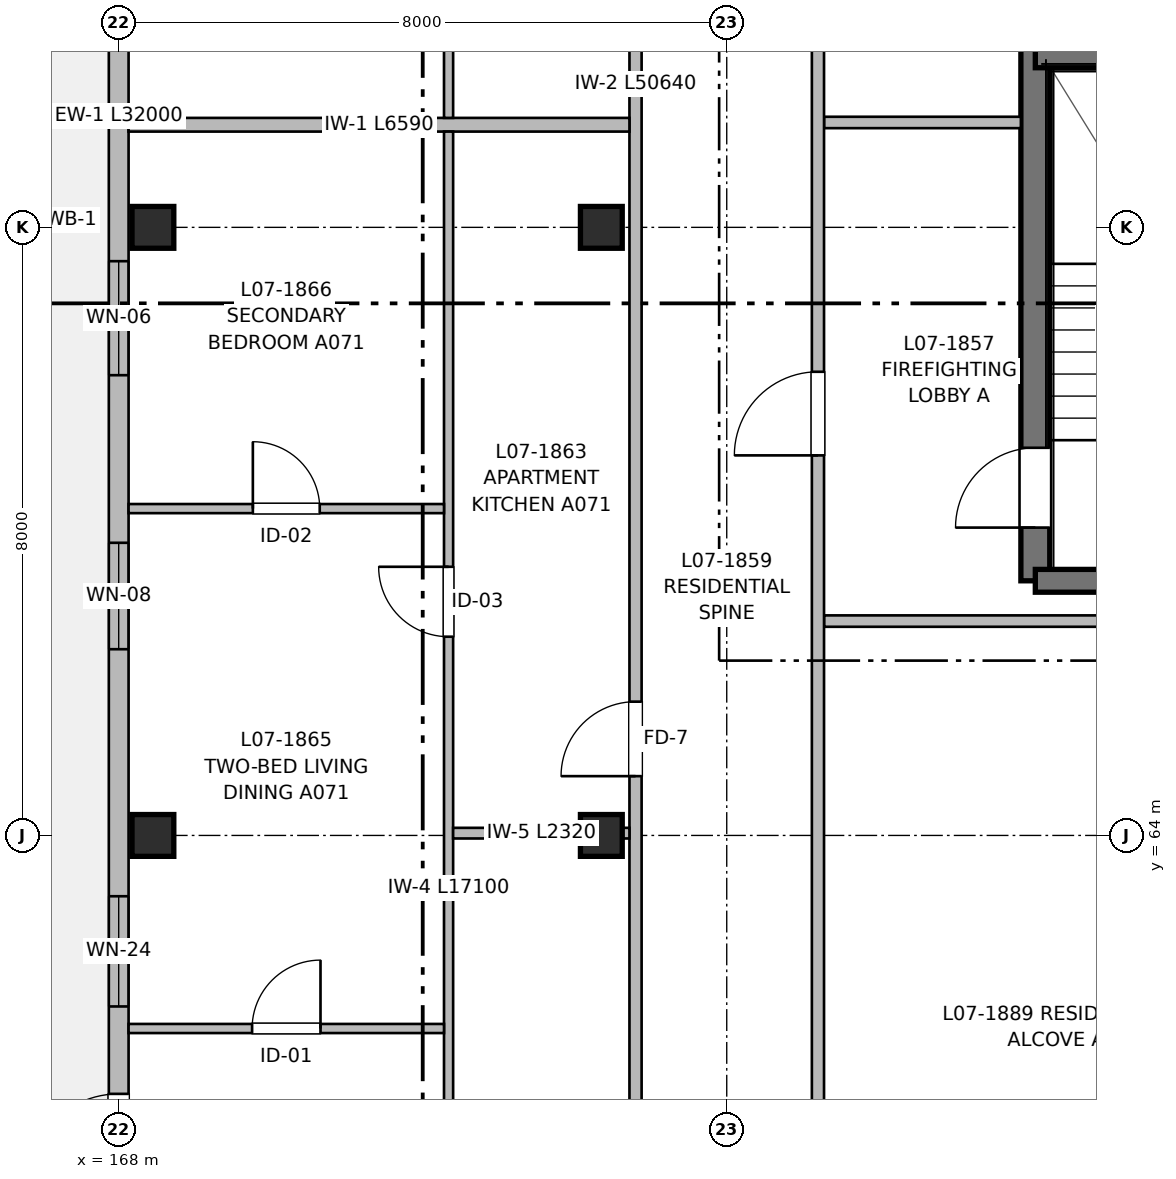
"""IFC4 building model, lengths in metres.
Left out: names, types, materials, properties, quantities, classifications, styles, units other than length and angle.
Written with IfcOpenShell. Run it as: python <this file> out.ifc"""

import sys

from ifc_helpers import new_model, si_unit, direction, frame, frame_2d, origin, origin_2d, place, context, subcontext, project, spatial, rectangle, extrude, element, fill, save


model = new_model("IFC4")
c1 = context("Model", 3, precision=1e-05, world=origin(), true_north=direction((0.0, 1.0)))
c2 = subcontext(c1, "Body", "Model", "MODEL_VIEW")
j1 = project(units=[si_unit("LENGTHUNIT", "METRE"), si_unit("PLANEANGLEUNIT", "RADIAN")], contexts=[c1])
p1 = place(None, origin())
s1 = spatial("IfcSite", under=j1, at=p1, CompositionType="ELEMENT")
p2 = place(p1, origin())
s2 = spatial("IfcBuilding", under=s1, at=p2, CompositionType="ELEMENT")
p3 = place(p2, frame((0.0, 0.0, 23.36)))
s3 = spatial("IfcBuildingStorey", under=s2, at=p3, CompositionType="ELEMENT", Elevation=23.36)
for number, where, z_axis, x_axis in (
    (1, (168.45, 64.0, 0.0), (0.0, 0.0, 1.0), (1.0, 0.0, 0.0)),
    (2, (168.45, 72.0, 0.0), (0.0, 0.0, 1.0), (1.0, 0.0, 0.0)),
    (3, (174.35, 64.0, 0.0), (0.0, 0.0, 1.0), (1.0, 0.0, 0.0)),
    (4, (174.35, 72.0, 0.0), (0.0, 0.0, 1.0), (1.0, 0.0, 0.0)),
):
    element("IfcColumn", number, at=place(p3, frame(where, z_axis=z_axis, x_axis=x_axis)), inside=s3, PredefinedType="COLUMN", context=c2, shape_type="SweptSolid", body=[
        extrude(rectangle(XDim=0.55, YDim=0.55, at=origin_2d()), origin(), (0.0, 0.0, 1.0), 3.2),
    ])
p4 = place(p3, frame((180.06, 67.35, 0.0), z_axis=(0.0, 0.0, 1.0), x_axis=(0.0, 1.0, 0.0)))
e5 = element("IfcWall", 5, at=p4, inside=s3, PredefinedType="SHEAR", context=c2, shape_type="SweptSolid", body=[
    extrude(rectangle(XDim=13.15, YDim=0.38, at=frame_2d((6.575, 0.0))), origin(), (0.0, 0.0, 1.0), 3.2),
])
p5 = place(p4, frame((0.7, 0.0, 0.0)))
e6 = element("IfcOpeningElement", 6, at=p5, cuts=e5, PredefinedType="OPENING", context=c2, shape_type="SweptSolid", body=[
    extrude(rectangle(XDim=1.05, YDim=2.15, at=frame_2d((0.525, 1.075))), frame((0.0, 0.2, 0.0), z_axis=(0.0, -1.0, 0.0), x_axis=(1.0, 0.0, 0.0)), (0.0, 0.0, 1.0), 0.4),
])
p6 = place(p3, frame((183.47, 67.35, 0.0), z_axis=(0.0, 0.0, 1.0), x_axis=(-1.0, 0.0, 0.0)))
e7 = element("IfcWall", 7, at=p6, inside=s3, PredefinedType="SHEAR", context=c2, shape_type="SweptSolid", body=[
    extrude(rectangle(XDim=3.41, YDim=0.3, at=frame_2d((1.705, 0.0))), origin(), (0.0, 0.0, 1.0), 3.2),
])
p7 = place(p3, frame((180.06, 74.24, 0.0), z_axis=(0.0, 0.0, 1.0), x_axis=(1.0, 0.0, 0.0)))
e8 = element("IfcWall", 8, at=p7, inside=s3, PredefinedType="SHEAR", context=c2, shape_type="SweptSolid", body=[
    extrude(rectangle(XDim=3.41, YDim=0.28, at=frame_2d((1.705, 0.0))), origin(), (0.0, 0.0, 1.0), 3.2),
])
p8 = place(p3, frame((168.0, 56.0, 0.0), z_axis=(0.0, 0.0, 1.0), x_axis=(0.0, 1.0, 0.0)))
e9 = element("IfcWall", 9, at=p8, inside=s3, PredefinedType="SOLIDWALL", context=c2, shape_type="SweptSolid", body=[
    extrude(rectangle(XDim=32.0, YDim=0.26, at=frame_2d((16.0, 0.0))), origin(), (0.0, 0.0, 1.0), 2.98),
])
p9 = place(p8, frame((3.4, 0.0, 0.0)))
e10 = element("IfcOpeningElement", 10, at=p9, cuts=e9, PredefinedType="OPENING", context=c2, shape_type="SweptSolid", body=[
    extrude(rectangle(XDim=1.2, YDim=2.2, at=frame_2d((0.6, 1.1))), frame((0.0, 0.14, 0.0), z_axis=(0.0, -1.0, 0.0), x_axis=(1.0, 0.0, 0.0)), (0.0, 0.0, 1.0), 0.28),
])
p10 = place(p8, frame((5.75, 0.0, 0.77)))
e11 = element("IfcOpeningElement", 11, at=p10, cuts=e9, PredefinedType="OPENING", context=c2, shape_type="SweptSolid", body=[
    extrude(rectangle(XDim=1.45, YDim=1.45, at=frame_2d((0.725, 0.725))), frame((0.0, 0.14, 0.0), z_axis=(0.0, -1.0, 0.0), x_axis=(1.0, 0.0, 0.0)), (0.0, 0.0, 1.0), 0.28),
])
p11 = place(p8, frame((10.45, 0.0, 0.87)))
e12 = element("IfcOpeningElement", 12, at=p11, cuts=e9, PredefinedType="OPENING", context=c2, shape_type="SweptSolid", body=[
    extrude(rectangle(XDim=1.4, YDim=1.35, at=frame_2d((0.7, 0.675))), frame((0.0, 0.14, 0.0), z_axis=(0.0, -1.0, 0.0), x_axis=(1.0, 0.0, 0.0)), (0.0, 0.0, 1.0), 0.28),
])
p12 = place(p8, frame((19.375, 0.0, 0.87)))
e13 = element("IfcOpeningElement", 13, at=p12, cuts=e9, PredefinedType="OPENING", context=c2, shape_type="SweptSolid", body=[
    extrude(rectangle(XDim=1.25, YDim=1.35, at=frame_2d((0.625, 0.675))), frame((0.0, 0.14, 0.0), z_axis=(0.0, -1.0, 0.0), x_axis=(1.0, 0.0, 0.0)), (0.0, 0.0, 1.0), 0.28),
])
p13 = place(p8, frame((27.35, 0.0, 0.82)))
e14 = element("IfcOpeningElement", 14, at=p13, cuts=e9, PredefinedType="OPENING", context=c2, shape_type="SweptSolid", body=[
    extrude(rectangle(XDim=1.3, YDim=1.4, at=frame_2d((0.65, 0.7))), frame((0.0, 0.14, 0.0), z_axis=(0.0, -1.0, 0.0), x_axis=(1.0, 0.0, 0.0)), (0.0, 0.0, 1.0), 0.28),
])
p14 = place(p8, frame((14.055, 0.0, 0.82)))
e15 = element("IfcOpeningElement", 15, at=p14, cuts=e9, PredefinedType="OPENING", context=c2, shape_type="SweptSolid", body=[
    extrude(rectangle(XDim=1.5, YDim=1.4, at=frame_2d((0.75, 0.7))), frame((0.0, 0.14, 0.0), z_axis=(0.0, -1.0, 0.0), x_axis=(1.0, 0.0, 0.0)), (0.0, 0.0, 1.0), 0.28),
])
p15 = place(p8, frame((29.945, 0.0, 0.82)))
e16 = element("IfcOpeningElement", 16, at=p15, cuts=e9, PredefinedType="OPENING", context=c2, shape_type="SweptSolid", body=[
    extrude(rectangle(XDim=1.5, YDim=1.4, at=frame_2d((0.75, 0.7))), frame((0.0, 0.14, 0.0), z_axis=(0.0, -1.0, 0.0), x_axis=(1.0, 0.0, 0.0)), (0.0, 0.0, 1.0), 0.28),
])
p16 = place(p3, frame((177.28, 66.82, 0.0), z_axis=(0.0, 0.0, 1.0), x_axis=(1.0, 0.0, 0.0)))
e17 = element("IfcWall", 17, at=p16, inside=s3, PredefinedType="PARTITIONING", context=c2, shape_type="SweptSolid", body=[
    extrude(rectangle(XDim=6.59, YDim=0.15, at=frame_2d((3.295, 0.0))), origin(), (0.0, 0.0, 1.0), 2.935),
])
p17 = place(p3, frame((177.28, 73.38, 0.0), z_axis=(0.0, 0.0, 1.0), x_axis=(1.0, 0.0, 0.0)))
e18 = element("IfcWall", 18, at=p17, inside=s3, PredefinedType="PARTITIONING", context=c2, shape_type="SweptSolid", body=[
    extrude(rectangle(XDim=2.59, YDim=0.15, at=frame_2d((1.295, 0.0))), origin(), (0.0, 0.0, 1.0), 2.935),
])
p18 = place(p3, frame((174.8, 56.16, 0.0), z_axis=(0.0, 0.0, 1.0), x_axis=(0.0, 1.0, 0.0)))
e19 = element("IfcWall", 19, at=p18, inside=s3, PredefinedType="PARTITIONING", context=c2, shape_type="SweptSolid", body=[
    extrude(rectangle(XDim=50.64, YDim=0.16, at=frame_2d((25.32, 0.0))), origin(), (0.0, 0.0, 1.0), 2.935),
])
p19 = place(p18, frame((8.62, 0.0, 0.0)))
e20 = element("IfcOpeningElement", 20, at=p19, cuts=e19, PredefinedType="OPENING", context=c2, shape_type="SweptSolid", body=[
    extrude(rectangle(XDim=0.98, YDim=2.15, at=frame_2d((0.49, 1.075))), frame((0.0, 0.09, 0.0), z_axis=(0.0, -1.0, 0.0), x_axis=(1.0, 0.0, 0.0)), (0.0, 0.0, 1.0), 0.18),
])
p20 = place(p18, frame((25.85, 0.0, 0.0)))
e21 = element("IfcOpeningElement", 21, at=p20, cuts=e19, PredefinedType="OPENING", context=c2, shape_type="SweptSolid", body=[
    extrude(rectangle(XDim=1.02, YDim=2.15, at=frame_2d((0.51, 1.075))), frame((0.0, 0.09, 0.0), z_axis=(0.0, -1.0, 0.0), x_axis=(1.0, 0.0, 0.0)), (0.0, 0.0, 1.0), 0.18),
])
p21 = place(p18, frame((42.62, 0.0, 0.0)))
e22 = element("IfcOpeningElement", 22, at=p21, cuts=e19, PredefinedType="OPENING", context=c2, shape_type="SweptSolid", body=[
    extrude(rectangle(XDim=0.98, YDim=2.15, at=frame_2d((0.49, 1.075))), frame((0.0, 0.09, 0.0), z_axis=(0.0, -1.0, 0.0), x_axis=(1.0, 0.0, 0.0)), (0.0, 0.0, 1.0), 0.18),
])
p22 = place(p3, frame((177.2, 56.16, 0.0), z_axis=(0.0, 0.0, 1.0), x_axis=(0.0, 1.0, 0.0)))
e23 = element("IfcWall", 23, at=p22, inside=s3, PredefinedType="PARTITIONING", context=c2, shape_type="SweptSolid", body=[
    extrude(rectangle(XDim=50.64, YDim=0.16, at=frame_2d((25.32, 0.0))), origin(), (0.0, 0.0, 1.0), 2.935),
])
p23 = place(p22, frame((12.84, 0.0, 0.0)))
e24 = element("IfcOpeningElement", 24, at=p23, cuts=e23, PredefinedType="OPENING", context=c2, shape_type="SweptSolid", body=[
    extrude(rectangle(XDim=1.1, YDim=2.15, at=frame_2d((0.55, 1.075))), frame((0.0, 0.09, 0.0), z_axis=(0.0, -1.0, 0.0), x_axis=(1.0, 0.0, 0.0)), (0.0, 0.0, 1.0), 0.18),
])
p24 = place(p22, frame((19.24, 0.0, 0.0)))
e25 = element("IfcOpeningElement", 25, at=p24, cuts=e23, PredefinedType="OPENING", context=c2, shape_type="SweptSolid", body=[
    extrude(rectangle(XDim=1.6, YDim=2.15, at=frame_2d((0.8, 1.075))), frame((0.0, 0.09, 0.0), z_axis=(0.0, -1.0, 0.0), x_axis=(1.0, 0.0, 0.0)), (0.0, 0.0, 1.0), 0.18),
])
p25 = place(p22, frame((1.8, 0.0, 0.0)))
e26 = element("IfcOpeningElement", 26, at=p25, cuts=e23, PredefinedType="OPENING", context=c2, shape_type="SweptSolid", body=[
    extrude(rectangle(XDim=0.96, YDim=2.15, at=frame_2d((0.48, 1.075))), frame((0.0, 0.09, 0.0), z_axis=(0.0, -1.0, 0.0), x_axis=(1.0, 0.0, 0.0)), (0.0, 0.0, 1.0), 0.18),
])
p26 = place(p22, frame((32.87, 0.0, 0.0)))
e27 = element("IfcOpeningElement", 27, at=p26, cuts=e23, PredefinedType="OPENING", context=c2, shape_type="SweptSolid", body=[
    extrude(rectangle(XDim=0.98, YDim=2.15, at=frame_2d((0.49, 1.075))), frame((0.0, 0.09, 0.0), z_axis=(0.0, -1.0, 0.0), x_axis=(1.0, 0.0, 0.0)), (0.0, 0.0, 1.0), 0.18),
])
p27 = place(p22, frame((41.13, 0.0, 0.0)))
e28 = element("IfcOpeningElement", 28, at=p27, cuts=e23, PredefinedType="OPENING", context=c2, shape_type="SweptSolid", body=[
    extrude(rectangle(XDim=0.98, YDim=2.15, at=frame_2d((0.49, 1.075))), frame((0.0, 0.09, 0.0), z_axis=(0.0, -1.0, 0.0), x_axis=(1.0, 0.0, 0.0)), (0.0, 0.0, 1.0), 0.18),
])
p28 = place(p3, frame((168.13, 73.35, 0.0), z_axis=(0.0, 0.0, 1.0), x_axis=(1.0, 0.0, 0.0)))
e29 = element("IfcWall", 29, at=p28, inside=s3, PredefinedType="PARTITIONING", context=c2, shape_type="SweptSolid", body=[
    extrude(rectangle(XDim=6.59, YDim=0.18, at=frame_2d((3.295, 0.0))), origin(), (0.0, 0.0, 1.0), 2.935),
])
p29 = place(p3, frame((172.34, 56.16, 0.0), z_axis=(0.0, 0.0, 1.0), x_axis=(0.0, 1.0, 0.0)))
e30 = element("IfcWall", 30, at=p29, inside=s3, PredefinedType="PARTITIONING", context=c2, shape_type="SweptSolid", body=[
    extrude(rectangle(XDim=17.1, YDim=0.12, at=frame_2d((8.55, 0.0))), origin(), (0.0, 0.0, 1.0), 2.935),
])
p30 = place(p29, frame((2.99, 0.0, 0.0)))
e31 = element("IfcOpeningElement", 31, at=p30, cuts=e30, PredefinedType="OPENING", context=c2, shape_type="SweptSolid", body=[
    extrude(rectangle(XDim=0.86, YDim=2.1, at=frame_2d((0.43, 1.05))), frame((0.0, 0.07, 0.0), z_axis=(0.0, -1.0, 0.0), x_axis=(1.0, 0.0, 0.0)), (0.0, 0.0, 1.0), 0.14),
])
p31 = place(p29, frame((10.454, 0.0, 0.0)))
e32 = element("IfcOpeningElement", 32, at=p31, cuts=e30, PredefinedType="OPENING", context=c2, shape_type="SweptSolid", body=[
    extrude(rectangle(XDim=0.92, YDim=2.1, at=frame_2d((0.46, 1.05))), frame((0.0, 0.07, 0.0), z_axis=(0.0, -1.0, 0.0), x_axis=(1.0, 0.0, 0.0)), (0.0, 0.0, 1.0), 0.14),
])
p32 = place(p3, frame((172.4, 64.03, 0.0), z_axis=(0.0, 0.0, 1.0), x_axis=(1.0, 0.0, 0.0)))
e33 = element("IfcWall", 33, at=p32, inside=s3, PredefinedType="PARTITIONING", context=c2, shape_type="SweptSolid", body=[
    extrude(rectangle(XDim=2.32, YDim=0.14, at=frame_2d((1.16, 0.0))), origin(), (0.0, 0.0, 1.0), 2.53),
])
p33 = place(p3, frame((168.13, 61.46, 0.0), z_axis=(0.0, 0.0, 1.0), x_axis=(1.0, 0.0, 0.0)))
e34 = element("IfcWall", 34, at=p33, inside=s3, PredefinedType="PARTITIONING", context=c2, shape_type="SweptSolid", body=[
    extrude(rectangle(XDim=4.15, YDim=0.12, at=frame_2d((2.075, 0.0))), origin(), (0.0, 0.0, 1.0), 2.935),
])
p34 = place(p33, frame((1.625, 0.0, 0.0)))
e35 = element("IfcOpeningElement", 35, at=p34, cuts=e34, PredefinedType="OPENING", context=c2, shape_type="SweptSolid", body=[
    extrude(rectangle(XDim=0.9, YDim=2.1, at=frame_2d((0.45, 1.05))), frame((0.0, 0.07, 0.0), z_axis=(0.0, -1.0, 0.0), x_axis=(1.0, 0.0, 0.0)), (0.0, 0.0, 1.0), 0.14),
])
p35 = place(p3, frame((168.13, 68.3, 0.0), z_axis=(0.0, 0.0, 1.0), x_axis=(1.0, 0.0, 0.0)))
e36 = element("IfcWall", 36, at=p35, inside=s3, PredefinedType="PARTITIONING", context=c2, shape_type="SweptSolid", body=[
    extrude(rectangle(XDim=4.15, YDim=0.12, at=frame_2d((2.075, 0.0))), origin(), (0.0, 0.0, 1.0), 2.935),
])
p36 = place(p35, frame((1.635, 0.0, 0.0)))
e37 = element("IfcOpeningElement", 37, at=p36, cuts=e36, PredefinedType="OPENING", context=c2, shape_type="SweptSolid", body=[
    extrude(rectangle(XDim=0.88, YDim=2.1, at=frame_2d((0.44, 1.05))), frame((0.0, 0.07, 0.0), z_axis=(0.0, -1.0, 0.0), x_axis=(1.0, 0.0, 0.0)), (0.0, 0.0, 1.0), 0.14),
])
p37 = place(p3, frame((172.34, 73.44, 0.0), z_axis=(0.0, 0.0, 1.0), x_axis=(0.0, 1.0, 0.0)))
e38 = element("IfcWall", 38, at=p37, inside=s3, PredefinedType="PARTITIONING", context=c2, shape_type="SweptSolid", body=[
    extrude(rectangle(XDim=17.01, YDim=0.12, at=frame_2d((8.505, 0.0))), origin(), (0.0, 0.0, 1.0), 2.935),
])
p38 = place(p37, frame((2.972, 0.0, 0.0)))
e39 = element("IfcOpeningElement", 39, at=p38, cuts=e38, PredefinedType="OPENING", context=c2, shape_type="SweptSolid", body=[
    extrude(rectangle(XDim=0.94, YDim=2.1, at=frame_2d((0.47, 1.05))), frame((0.0, 0.07, 0.0), z_axis=(0.0, -1.0, 0.0), x_axis=(1.0, 0.0, 0.0)), (0.0, 0.0, 1.0), 0.14),
])
p39 = place(p37, frame((10.393, 0.0, 0.0)))
e40 = element("IfcOpeningElement", 40, at=p39, cuts=e38, PredefinedType="OPENING", context=c2, shape_type="SweptSolid", body=[
    extrude(rectangle(XDim=0.92, YDim=2.1, at=frame_2d((0.46, 1.05))), frame((0.0, 0.07, 0.0), z_axis=(0.0, -1.0, 0.0), x_axis=(1.0, 0.0, 0.0)), (0.0, 0.0, 1.0), 0.14),
])
p40 = place(p5, origin())
e41 = element("IfcDoor", 41, at=p40, inside=s3, OperationType="SINGLE_SWING_LEFT", PredefinedType="DOOR", context=c2, shape_type="SweptSolid", body=[
    extrude(rectangle(XDim=1.05, YDim=2.15, at=frame_2d((0.525, 1.075))), frame((0.0, 0.025, 0.0), z_axis=(0.0, -1.0, 0.0), x_axis=(1.0, 0.0, 0.0)), (0.0, 0.0, 1.0), 0.05),
])
fill(e6, e41)
p41 = place(p9, origin())
e42 = element("IfcDoor", 42, at=p41, inside=s3, OperationType="SINGLE_SWING_LEFT", PredefinedType="DOOR", context=c2, shape_type="SweptSolid", body=[
    extrude(rectangle(XDim=1.2, YDim=2.2, at=frame_2d((0.6, 1.1))), frame((0.0, 0.025, 0.0), z_axis=(0.0, -1.0, 0.0), x_axis=(1.0, 0.0, 0.0)), (0.0, 0.0, 1.0), 0.05),
])
fill(e10, e42)
p42 = place(p10, origin())
e43 = element("IfcWindow", 43, at=p42, inside=s3, PartitioningType="SINGLE_PANEL", PredefinedType="WINDOW", context=c2, shape_type="SweptSolid", body=[
    extrude(rectangle(XDim=1.45, YDim=1.45, at=frame_2d((0.725, 0.725))), frame((0.0, 0.03, 0.0), z_axis=(0.0, -1.0, 0.0), x_axis=(1.0, 0.0, 0.0)), (0.0, 0.0, 1.0), 0.06),
])
fill(e11, e43)
p43 = place(p11, origin())
e44 = element("IfcWindow", 44, at=p43, inside=s3, PartitioningType="SINGLE_PANEL", PredefinedType="WINDOW", context=c2, shape_type="SweptSolid", body=[
    extrude(rectangle(XDim=1.4, YDim=1.35, at=frame_2d((0.7, 0.675))), frame((0.0, 0.03, 0.0), z_axis=(0.0, -1.0, 0.0), x_axis=(1.0, 0.0, 0.0)), (0.0, 0.0, 1.0), 0.06),
])
fill(e12, e44)
p44 = place(p23, origin())
e45 = element("IfcDoor", 45, at=p44, inside=s3, OperationType="SINGLE_SWING_LEFT", PredefinedType="DOOR", context=c2, shape_type="SweptSolid", body=[
    extrude(rectangle(XDim=1.1, YDim=2.15, at=frame_2d((0.55, 1.075))), frame((0.0, 0.025, 0.0), z_axis=(0.0, -1.0, 0.0), x_axis=(1.0, 0.0, 0.0)), (0.0, 0.0, 1.0), 0.05),
])
fill(e24, e45)
p45 = place(p31, origin())
e46 = element("IfcDoor", 46, at=p45, inside=s3, OperationType="SINGLE_SWING_RIGHT", PredefinedType="DOOR", context=c2, shape_type="SweptSolid", body=[
    extrude(rectangle(XDim=0.92, YDim=2.1, at=frame_2d((0.46, 1.05))), frame((0.0, 0.025, 0.0), z_axis=(0.0, -1.0, 0.0), x_axis=(1.0, 0.0, 0.0)), (0.0, 0.0, 1.0), 0.05),
])
fill(e32, e46)
p46 = place(p19, origin())
e47 = element("IfcDoor", 47, at=p46, inside=s3, OperationType="SINGLE_SWING_LEFT", PredefinedType="DOOR", context=c2, shape_type="SweptSolid", body=[
    extrude(rectangle(XDim=0.98, YDim=2.15, at=frame_2d((0.49, 1.075))), frame((0.0, 0.025, 0.0), z_axis=(0.0, -1.0, 0.0), x_axis=(1.0, 0.0, 0.0)), (0.0, 0.0, 1.0), 0.05),
])
fill(e20, e47)
p47 = place(p34, origin())
e48 = element("IfcDoor", 48, at=p47, inside=s3, OperationType="SINGLE_SWING_RIGHT", PredefinedType="DOOR", context=c2, shape_type="SweptSolid", body=[
    extrude(rectangle(XDim=0.9, YDim=2.1, at=frame_2d((0.45, 1.05))), frame((0.0, 0.025, 0.0), z_axis=(0.0, -1.0, 0.0), x_axis=(1.0, 0.0, 0.0)), (0.0, 0.0, 1.0), 0.05),
])
fill(e35, e48)
p48 = place(p36, origin())
e49 = element("IfcDoor", 49, at=p48, inside=s3, OperationType="SINGLE_SWING_LEFT", PredefinedType="DOOR", context=c2, shape_type="SweptSolid", body=[
    extrude(rectangle(XDim=0.88, YDim=2.1, at=frame_2d((0.44, 1.05))), frame((0.0, 0.025, 0.0), z_axis=(0.0, -1.0, 0.0), x_axis=(1.0, 0.0, 0.0)), (0.0, 0.0, 1.0), 0.05),
])
fill(e37, e49)
p49 = place(p14, origin())
e50 = element("IfcWindow", 50, at=p49, inside=s3, PartitioningType="SINGLE_PANEL", PredefinedType="WINDOW", context=c2, shape_type="SweptSolid", body=[
    extrude(rectangle(XDim=1.5, YDim=1.4, at=frame_2d((0.75, 0.7))), frame((0.0, 0.03, 0.0), z_axis=(0.0, -1.0, 0.0), x_axis=(1.0, 0.0, 0.0)), (0.0, 0.0, 1.0), 0.06),
])
fill(e15, e50)
save(model, sys.argv[1])
